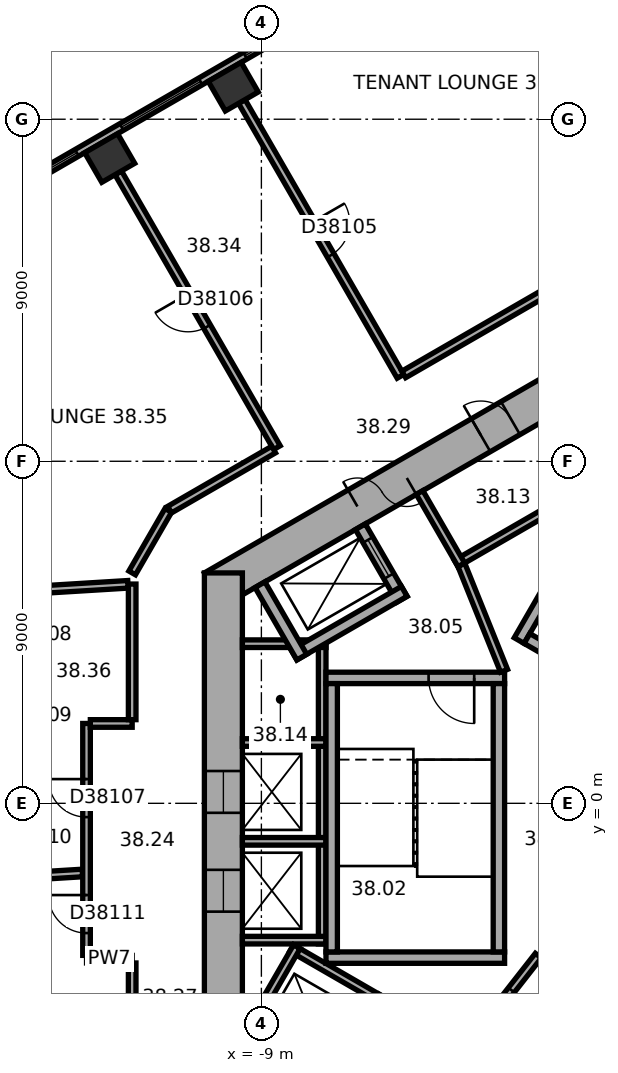
"""IFC4 building model, lengths in metres.
Left out: names, types, materials, properties, quantities, classifications, styles, units other than length and angle.
Written with IfcOpenShell. Run it as: python <this file> out.ifc"""

import sys

from ifc_helpers import new_model, si_unit, direction, frame, frame_2d, origin, origin_2d, place, context, subcontext, project, spatial, rectangle, extrude, element, fill, save


model = new_model("IFC4")
c1 = context("Model", 3, precision=1e-05, world=origin(), true_north=direction((0.0, 1.0)))
c2 = subcontext(c1, "Body", "Model", "MODEL_VIEW")
j1 = project(units=[si_unit("LENGTHUNIT", "METRE"), si_unit("PLANEANGLEUNIT", "RADIAN")], contexts=[c1])
p1 = place(None, origin())
s1 = spatial("IfcSite", under=j1, at=p1, CompositionType="ELEMENT")
p2 = place(p1, origin())
s2 = spatial("IfcBuilding", under=s1, at=p2, CompositionType="ELEMENT")
p3 = place(p2, frame((0.0, 0.0, 157.7)))
s3 = spatial("IfcBuildingStorey", under=s2, at=p3, CompositionType="ELEMENT", Elevation=157.7)
for number, where, z_axis, x_axis in (
    (1, (-9.74, 18.856, 0.0), (0.0, 0.0, 1.0), (-0.866, -0.5, 0.0)),
    (2, (-12.991, 16.979, 0.0), (0.0, 0.0, 1.0), (-0.866, -0.5, 0.0)),
):
    element("IfcColumn", number, at=place(p3, frame(where, z_axis=z_axis, x_axis=x_axis)), inside=s3, PredefinedType="COLUMN", context=c2, shape_type="SweptSolid", body=[
        extrude(rectangle(XDim=1.0, YDim=0.9, at=origin_2d()), origin(), (0.0, 0.0, 1.0), 3.7),
    ])
p4 = place(p3, frame((0.25, 11.691, 0.0), z_axis=(0.0, 0.0, 1.0), x_axis=(-0.866022616891, -0.50000482701, 0.0)))
e3 = element("IfcWall", 3, at=p4, inside=s3, PredefinedType="SHEAR", context=c2, shape_type="SweptSolid", body=[
    extrude(rectangle(XDim=12.125, YDim=1.0, at=frame_2d((6.062, 0.0))), origin(), (0.0, 0.0, 1.0), 3.7),
])
p5 = place(p4, frame((6.262, 0.0, 0.0)))
e4 = element("IfcOpeningElement", 4, at=p5, cuts=e3, PredefinedType="OPENING", context=c2, shape_type="SweptSolid", body=[
    extrude(rectangle(XDim=1.5, YDim=2.1, at=frame_2d((0.75, 1.05))), frame((0.0, 0.51, 0.0), z_axis=(0.0, -1.0, 0.0), x_axis=(1.0, 0.0, 0.0)), (0.0, 0.0, 1.0), 1.02),
])
p6 = place(p4, frame((3.112, 0.0, 0.0)))
e5 = element("IfcOpeningElement", 5, at=p6, cuts=e3, PredefinedType="OPENING", context=c2, shape_type="SweptSolid", body=[
    extrude(rectangle(XDim=0.9, YDim=2.1, at=frame_2d((0.45, 1.05))), frame((0.0, 0.51, 0.0), z_axis=(0.0, -1.0, 0.0), x_axis=(1.0, 0.0, 0.0)), (0.0, 0.0, 1.0), 1.02),
])
p7 = place(p3, frame((-10.0, 6.062, 0.0), z_axis=(0.0, 0.0, 1.0), x_axis=(0.0, -1.0, 0.0)))
e6 = element("IfcWall", 6, at=p7, inside=s3, PredefinedType="SHEAR", context=c2, shape_type="SweptSolid", body=[
    extrude(rectangle(XDim=12.125, YDim=1.0, at=frame_2d((6.062, 0.0))), origin(), (0.0, 0.0, 1.0), 3.7),
])
p8 = place(p7, frame((5.212, 0.0, 0.0)))
e7 = element("IfcOpeningElement", 7, at=p8, cuts=e6, PredefinedType="OPENING", context=c2, shape_type="SweptSolid", body=[
    extrude(rectangle(XDim=1.1, YDim=2.1, at=frame_2d((0.55, 1.05))), frame((0.0, 0.51, 0.0), z_axis=(0.0, -1.0, 0.0), x_axis=(1.0, 0.0, 0.0)), (0.0, 0.0, 1.0), 1.02),
])
p9 = place(p7, frame((7.812, 0.0, 0.0)))
e8 = element("IfcOpeningElement", 8, at=p9, cuts=e6, PredefinedType="OPENING", context=c2, shape_type="SweptSolid", body=[
    extrude(rectangle(XDim=1.1, YDim=2.1, at=frame_2d((0.55, 1.05))), frame((0.0, 0.51, 0.0), z_axis=(0.0, -1.0, 0.0), x_axis=(1.0, 0.0, 0.0)), (0.0, 0.0, 1.0), 1.02),
])
p10 = place(p3, frame((-2.961, 23.405, 0.0), z_axis=(0.0, 0.0, 1.0), x_axis=(-0.866023315909, -0.500003616288, 0.0)))
e9 = element("IfcWall", 9, at=p10, inside=s3, PredefinedType="STANDARD", context=c2, shape_type="SweptSolid", body=[
    extrude(rectangle(XDim=20.044, YDim=0.2, at=frame_2d((10.022, 0.0))), origin(), (0.0, 0.0, 1.0), 3.7),
])
p11 = place(p10, frame((1.314, 0.0, 0.9)))
e10 = element("IfcOpeningElement", 10, at=p11, cuts=e9, PredefinedType="OPENING", context=c2, shape_type="SweptSolid", body=[
    extrude(rectangle(XDim=2.4, YDim=2.0, at=frame_2d((1.2, 1.0))), frame((0.0, 0.11, 0.0), z_axis=(0.0, -1.0, 0.0), x_axis=(1.0, 0.0, 0.0)), (0.0, 0.0, 1.0), 0.22),
])
p12 = place(p10, frame((5.069, 0.0, 0.9)))
e11 = element("IfcOpeningElement", 11, at=p12, cuts=e9, PredefinedType="OPENING", context=c2, shape_type="SweptSolid", body=[
    extrude(rectangle(XDim=2.4, YDim=2.0, at=frame_2d((1.2, 1.0))), frame((0.0, 0.11, 0.0), z_axis=(0.0, -1.0, 0.0), x_axis=(1.0, 0.0, 0.0)), (0.0, 0.0, 1.0), 0.22),
])
p13 = place(p10, frame((8.823, 0.0, 0.9)))
e12 = element("IfcOpeningElement", 12, at=p13, cuts=e9, PredefinedType="OPENING", context=c2, shape_type="SweptSolid", body=[
    extrude(rectangle(XDim=2.4, YDim=2.0, at=frame_2d((1.2, 1.0))), frame((0.0, 0.11, 0.0), z_axis=(0.0, -1.0, 0.0), x_axis=(1.0, 0.0, 0.0)), (0.0, 0.0, 1.0), 0.22),
])
p14 = place(p10, frame((12.577, 0.0, 0.9)))
e13 = element("IfcOpeningElement", 13, at=p14, cuts=e9, PredefinedType="OPENING", context=c2, shape_type="SweptSolid", body=[
    extrude(rectangle(XDim=2.4, YDim=2.0, at=frame_2d((1.2, 1.0))), frame((0.0, 0.11, 0.0), z_axis=(0.0, -1.0, 0.0), x_axis=(1.0, 0.0, 0.0)), (0.0, 0.0, 1.0), 0.22),
])
p15 = place(p10, frame((16.331, 0.0, 0.9)))
e14 = element("IfcOpeningElement", 14, at=p15, cuts=e9, PredefinedType="OPENING", context=c2, shape_type="SweptSolid", body=[
    extrude(rectangle(XDim=2.4, YDim=2.0, at=frame_2d((1.2, 1.0))), frame((0.0, 0.11, 0.0), z_axis=(0.0, -1.0, 0.0), x_axis=(1.0, 0.0, 0.0)), (0.0, 0.0, 1.0), 0.22),
])
p16 = place(p3, frame((0.803, 9.009, 0.0), z_axis=(0.0, 0.0, 1.0), x_axis=(-0.866028230842, -0.499995103361, 0.0)))
e15 = element("IfcWall", 15, at=p16, inside=s3, PredefinedType="PARTITIONING", context=c2, shape_type="SweptSolid", body=[
    extrude(rectangle(XDim=5.4, YDim=0.2, at=frame_2d((2.7, 0.0))), origin(), (0.0, 0.0, 1.0), 3.42),
])
p17 = place(p3, frame((-3.737, 6.272, 0.0), z_axis=(0.0, 0.0, 1.0), x_axis=(-0.50002983664, 0.866008176907, 0.0)))
e16 = element("IfcWall", 16, at=p17, inside=s3, PredefinedType="PARTITIONING", context=c2, shape_type="SweptSolid", body=[
    extrude(rectangle(XDim=2.2, YDim=0.2, at=frame_2d((1.1, 0.0))), origin(), (0.0, 0.0, 1.0), 3.42),
])
p18 = place(p3, frame((-7.4, 4.3, 0.0), z_axis=(0.0, 0.0, 1.0), x_axis=(0.0, -1.0, 0.0)))
e17 = element("IfcWall", 17, at=p18, inside=s3, PredefinedType="PARTITIONING", context=c2, shape_type="SweptSolid", body=[
    extrude(rectangle(XDim=8.0, YDim=0.2, at=frame_2d((4.0, 0.0))), origin(), (0.0, 0.0, 1.0), 3.42),
])
for number, where, z_axis, x_axis in (
    (18, (-7.3, 4.2, 0.0), (0.0, 0.0, 1.0), (-1.0, 0.0, 0.0)),
    (19, (-7.3, 1.6, 0.0), (0.0, 0.0, 1.0), (-1.0, 0.0, 0.0)),
    (20, (-7.3, -1.0, 0.0), (0.0, 0.0, 1.0), (-1.0, 0.0, 0.0)),
    (21, (-7.3, -3.6, 0.0), (0.0, 0.0, 1.0), (-1.0, 0.0, 0.0)),
):
    element("IfcWall", number, at=place(p3, frame(where, z_axis=z_axis, x_axis=x_axis)), inside=s3, PredefinedType="PARTITIONING", context=c2, shape_type="SweptSolid", body=[
        extrude(rectangle(XDim=2.2, YDim=0.2, at=frame_2d((1.1, 0.0))), origin(), (0.0, 0.0, 1.0), 3.42),
    ])
p19 = place(p3, frame((-8.203, -3.809, 0.0), z_axis=(0.0, 0.0, 1.0), x_axis=(0.866028230842, -0.499995103361, 0.0)))
e22 = element("IfcWall", 22, at=p19, inside=s3, PredefinedType="PARTITIONING", context=c2, shape_type="SweptSolid", body=[
    extrude(rectangle(XDim=5.4, YDim=0.2, at=frame_2d((2.7, 0.0))), origin(), (0.0, 0.0, 1.0), 3.42),
])
p20 = place(p3, frame((-8.067, -3.772, 0.0), z_axis=(0.0, 0.0, 1.0), x_axis=(-0.50002983664, -0.866008176907, 0.0)))
e23 = element("IfcWall", 23, at=p20, inside=s3, PredefinedType="PARTITIONING", context=c2, shape_type="SweptSolid", body=[
    extrude(rectangle(XDim=2.2, YDim=0.2, at=frame_2d((1.1, 0.0))), origin(), (0.0, 0.0, 1.0), 3.42),
])
p21 = place(p3, frame((-2.216, 4.282, 0.0), z_axis=(0.0, 0.0, 1.0), x_axis=(0.499977259774, 0.866038532462, 0.0)))
e24 = element("IfcWall", 24, at=p21, inside=s3, PredefinedType="SHEAR", context=c2, shape_type="SweptSolid", body=[
    extrude(rectangle(XDim=4.7, YDim=0.3, at=frame_2d((2.35, 0.0))), origin(), (0.0, 0.0, 1.0), 3.42),
])
p22 = place(p3, frame((4.103, 0.807, 0.0), z_axis=(0.0, 0.0, 1.0), x_axis=(-0.866027801685, 0.499995846692, 0.0)))
e25 = element("IfcWall", 25, at=p22, inside=s3, PredefinedType="SHEAR", context=c2, shape_type="SweptSolid", body=[
    extrude(rectangle(XDim=7.06, YDim=0.3, at=frame_2d((3.53, 0.0))), origin(), (0.0, 0.0, 1.0), 3.42),
])
p23 = place(p3, frame((-2.6, 3.3, 0.0), z_axis=(0.0, 0.0, 1.0), x_axis=(-1.0, 0.0, 0.0)))
e26 = element("IfcWall", 26, at=p23, inside=s3, PredefinedType="SHEAR", context=c2, shape_type="SweptSolid", body=[
    extrude(rectangle(XDim=4.7, YDim=0.3, at=frame_2d((2.35, 0.0))), origin(), (0.0, 0.0, 1.0), 3.42),
])
p24 = place(p23, frame((0.8, 0.0, 0.0)))
e27 = element("IfcOpeningElement", 27, at=p24, cuts=e26, PredefinedType="OPENING", context=c2, shape_type="SweptSolid", body=[
    extrude(rectangle(XDim=1.2, YDim=2.1, at=frame_2d((0.6, 1.05))), frame((0.0, 0.16, 0.0), z_axis=(0.0, -1.0, 0.0), x_axis=(1.0, 0.0, 0.0)), (0.0, 0.0, 1.0), 0.32),
])
p25 = place(p3, frame((-2.6, -4.06, 0.0), z_axis=(0.0, 0.0, 1.0), x_axis=(-1.0, 0.0, 0.0)))
e28 = element("IfcWall", 28, at=p25, inside=s3, PredefinedType="SHEAR", context=c2, shape_type="SweptSolid", body=[
    extrude(rectangle(XDim=4.7, YDim=0.3, at=frame_2d((2.35, 0.0))), origin(), (0.0, 0.0, 1.0), 3.42),
])
for number, where, z_axis, x_axis in (
    (29, (-2.75, 3.15, 0.0), (0.0, 0.0, 1.0), (0.0, -1.0, 0.0)),
    (30, (-7.15, 3.15, 0.0), (0.0, 0.0, 1.0), (0.0, -1.0, 0.0)),
):
    element("IfcWall", number, at=place(p3, frame(where, z_axis=z_axis, x_axis=x_axis)), inside=s3, PredefinedType="SHEAR", context=c2, shape_type="SweptSolid", body=[
        extrude(rectangle(XDim=7.06, YDim=0.3, at=frame_2d((3.53, 0.0))), origin(), (0.0, 0.0, 1.0), 3.42),
    ])
p26 = place(p3, frame((-5.295, 5.372, 0.0), z_axis=(0.0, 0.0, 1.0), x_axis=(-0.500077893725, 0.86598042715, 0.0)))
e31 = element("IfcWall", 31, at=p26, inside=s3, PredefinedType="SHEAR", context=c2, shape_type="SweptSolid", body=[
    extrude(rectangle(XDim=2.2, YDim=0.3, at=frame_2d((1.1, 0.0))), origin(), (0.0, 0.0, 1.0), 3.42),
])
p27 = place(p26, frame((0.7, 0.0, 0.0)))
e32 = element("IfcOpeningElement", 32, at=p27, cuts=e31, PredefinedType="OPENING", context=c2, shape_type="SweptSolid", body=[
    extrude(rectangle(XDim=1.1, YDim=2.1, at=frame_2d((0.55, 1.05))), frame((0.0, 0.16, 0.0), z_axis=(0.0, -1.0, 0.0), x_axis=(1.0, 0.0, 0.0)), (0.0, 0.0, 1.0), 0.32),
])
p28 = place(p3, frame((-5.24, 5.577, 0.0), z_axis=(0.0, 0.0, 1.0), x_axis=(-0.866014461049, -0.500018952895, 0.0)))
e33 = element("IfcWall", 33, at=p28, inside=s3, PredefinedType="SHEAR", context=c2, shape_type="SweptSolid", body=[
    extrude(rectangle(XDim=3.35, YDim=0.3, at=frame_2d((1.675, 0.0))), origin(), (0.0, 0.0, 1.0), 3.42),
])
p29 = place(p3, frame((-7.937, 3.847, 0.0), z_axis=(0.0, 0.0, 1.0), x_axis=(-0.50002983664, 0.866008176907, 0.0)))
e34 = element("IfcWall", 34, at=p29, inside=s3, PredefinedType="SHEAR", context=c2, shape_type="SweptSolid", body=[
    extrude(rectangle(XDim=2.2, YDim=0.3, at=frame_2d((1.1, 0.0))), origin(), (0.0, 0.0, 1.0), 3.42),
])
p30 = place(p3, frame((-2.615, 3.487, 0.0), z_axis=(0.0, 0.0, 1.0), x_axis=(-0.373576831041, 0.92759924068, 0.0)))
e35 = element("IfcWall", 35, at=p30, inside=s3, PredefinedType="PARTITIONING", context=c2, shape_type="SweptSolid", body=[
    extrude(rectangle(XDim=3.002, YDim=0.2, at=frame_2d((1.501, 0.0))), origin(), (0.0, 0.0, 1.0), 3.42),
])
p31 = place(p3, frame((-1.712, -4.008, 0.0), z_axis=(0.0, 0.0, 1.0), x_axis=(-0.616549420702, -0.787316208287, 0.0)))
e36 = element("IfcWall", 36, at=p31, inside=s3, PredefinedType="PARTITIONING", context=c2, shape_type="SweptSolid", body=[
    extrude(rectangle(XDim=3.002, YDim=0.2, at=frame_2d((1.501, 0.0))), origin(), (0.0, 0.0, 1.0), 3.42),
])
p32 = place(p31, frame((1.15, 0.0, 0.0)))
e37 = element("IfcOpeningElement", 37, at=p32, cuts=e36, PredefinedType="OPENING", context=c2, shape_type="SweptSolid", body=[
    extrude(rectangle(XDim=0.9, YDim=2.1, at=frame_2d((0.45, 1.05))), frame((0.0, 0.11, 0.0), z_axis=(0.0, -1.0, 0.0), x_axis=(1.0, 0.0, 0.0)), (0.0, 0.0, 1.0), 0.22),
])
p33 = place(p3, frame((-21.109, 5.237, 0.0), z_axis=(0.0, 0.0, 1.0), x_axis=(0.998135264293, 0.061040922131, 0.0)))
e38 = element("IfcWall", 38, at=p33, inside=s3, PredefinedType="PARTITIONING", context=c2, shape_type="SweptSolid", body=[
    extrude(rectangle(XDim=8.615, YDim=0.2, at=frame_2d((4.308, 0.0))), origin(), (0.0, 0.0, 1.0), 3.42),
])
p34 = place(p3, frame((-20.651, -2.258, 0.0), z_axis=(0.0, 0.0, 1.0), x_axis=(0.998133960965, 0.061062230286, 0.0)))
e39 = element("IfcWall", 39, at=p34, inside=s3, PredefinedType="PARTITIONING", context=c2, shape_type="SweptSolid", body=[
    extrude(rectangle(XDim=6.953, YDim=0.2, at=frame_2d((3.477, 0.0))), origin(), (0.0, 0.0, 1.0), 3.42),
])
p35 = place(p3, frame((-13.601, -4.101, 0.0), z_axis=(0.0, 0.0, 1.0), x_axis=(1.0, 0.0, 0.0)))
e40 = element("IfcWall", 40, at=p35, inside=s3, PredefinedType="PARTITIONING", context=c2, shape_type="SweptSolid", body=[
    extrude(rectangle(XDim=1.201, YDim=0.2, at=frame_2d((0.601, 0.0))), origin(), (0.0, 0.0, 1.0), 3.42),
])
p36 = place(p3, frame((-13.601, 2.101, 0.0), z_axis=(0.0, 0.0, 1.0), x_axis=(0.0, -1.0, 0.0)))
e41 = element("IfcWall", 41, at=p36, inside=s3, PredefinedType="PARTITIONING", context=c2, shape_type="SweptSolid", body=[
    extrude(rectangle(XDim=6.102, YDim=0.2, at=frame_2d((3.051, 0.0))), origin(), (0.0, 0.0, 1.0), 3.42),
])
p37 = place(p36, frame((1.464, 0.0, 0.0)))
e42 = element("IfcOpeningElement", 42, at=p37, cuts=e41, PredefinedType="OPENING", context=c2, shape_type="SweptSolid", body=[
    extrude(rectangle(XDim=1.0, YDim=2.1, at=frame_2d((0.5, 1.05))), frame((0.0, 0.11, 0.0), z_axis=(0.0, -1.0, 0.0), x_axis=(1.0, 0.0, 0.0)), (0.0, 0.0, 1.0), 0.22),
])
p38 = place(p36, frame((4.515, 0.0, 0.0)))
e43 = element("IfcOpeningElement", 43, at=p38, cuts=e41, PredefinedType="OPENING", context=c2, shape_type="SweptSolid", body=[
    extrude(rectangle(XDim=1.0, YDim=2.1, at=frame_2d((0.5, 1.05))), frame((0.0, 0.11, 0.0), z_axis=(0.0, -1.0, 0.0), x_axis=(1.0, 0.0, 0.0)), (0.0, 0.0, 1.0), 0.22),
])
p39 = place(p3, frame((-12.766, 16.589, 0.0), z_axis=(0.0, 0.0, 1.0), x_axis=(0.500010139422, -0.866019549707, 0.0)))
e44 = element("IfcWall", 44, at=p39, inside=s3, PredefinedType="PARTITIONING", context=c2, shape_type="SweptSolid", body=[
    extrude(rectangle(XDim=8.35, YDim=0.2, at=frame_2d((4.175, 0.0))), origin(), (0.0, 0.0, 1.0), 3.42),
])
p40 = place(p39, frame((3.675, 0.0, 0.0)))
e45 = element("IfcOpeningElement", 45, at=p40, cuts=e44, PredefinedType="OPENING", context=c2, shape_type="SweptSolid", body=[
    extrude(rectangle(XDim=1.0, YDim=2.1, at=frame_2d((0.5, 1.05))), frame((0.0, 0.11, 0.0), z_axis=(0.0, -1.0, 0.0), x_axis=(1.0, 0.0, 0.0)), (0.0, 0.0, 1.0), 0.22),
])
p41 = place(p3, frame((-12.4, -4.201, 0.0), z_axis=(0.0, 0.0, 1.0), x_axis=(0.0, -1.0, 0.0)))
e46 = element("IfcWall", 46, at=p41, inside=s3, PredefinedType="PARTITIONING", context=c2, shape_type="SweptSolid", body=[
    extrude(rectangle(XDim=1.821, YDim=0.2, at=frame_2d((0.911, 0.0))), origin(), (0.0, 0.0, 1.0), 3.42),
])
p42 = place(p3, frame((-12.4, 2.101, 0.0), z_axis=(0.0, 0.0, 1.0), x_axis=(-1.0, 0.0, 0.0)))
e47 = element("IfcWall", 47, at=p42, inside=s3, PredefinedType="PARTITIONING", context=c2, shape_type="SweptSolid", body=[
    extrude(rectangle(XDim=1.101, YDim=0.2, at=frame_2d((0.551, 0.0))), origin(), (0.0, 0.0, 1.0), 3.42),
])
p43 = place(p3, frame((-12.4, 5.769, 0.0), z_axis=(0.0, 0.0, 1.0), x_axis=(0.0, -1.0, 0.0)))
e48 = element("IfcWall", 48, at=p43, inside=s3, PredefinedType="PARTITIONING", context=c2, shape_type="SweptSolid", body=[
    extrude(rectangle(XDim=3.568, YDim=0.2, at=frame_2d((1.784, 0.0))), origin(), (0.0, 0.0, 1.0), 3.42),
])
p44 = place(p3, frame((-11.45, 7.708, 0.0), z_axis=(0.0, 0.0, 1.0), x_axis=(-0.500022797313, -0.86601224135, 0.0)))
e49 = element("IfcWall", 49, at=p44, inside=s3, PredefinedType="PARTITIONING", context=c2, shape_type="SweptSolid", body=[
    extrude(rectangle(XDim=1.9, YDim=0.2, at=frame_2d((0.95, 0.0))), origin(), (0.0, 0.0, 1.0), 3.42),
])
p45 = place(p3, frame((-9.515, 18.466, 0.0), z_axis=(0.0, 0.0, 1.0), x_axis=(0.500010139422, -0.866019549707, 0.0)))
e50 = element("IfcWall", 50, at=p45, inside=s3, PredefinedType="PARTITIONING", context=c2, shape_type="SweptSolid", body=[
    extrude(rectangle(XDim=8.35, YDim=0.2, at=frame_2d((4.175, 0.0))), origin(), (0.0, 0.0, 1.0), 2.87),
])
p46 = place(p45, frame((3.675, 0.0, 0.0)))
e51 = element("IfcOpeningElement", 51, at=p46, cuts=e50, PredefinedType="OPENING", context=c2, shape_type="SweptSolid", body=[
    extrude(rectangle(XDim=1.0, YDim=2.1, at=frame_2d((0.5, 1.05))), frame((0.0, 0.11, 0.0), z_axis=(0.0, -1.0, 0.0), x_axis=(1.0, 0.0, 0.0)), (0.0, 0.0, 1.0), 0.22),
])
p47 = place(p3, frame((-8.678, 9.308, 0.0), z_axis=(0.0, 0.0, 1.0), x_axis=(-0.866000359435, -0.500043375578, 0.0)))
e52 = element("IfcWall", 52, at=p47, inside=s3, PredefinedType="PARTITIONING", context=c2, shape_type="SweptSolid", body=[
    extrude(rectangle(XDim=3.161, YDim=0.2, at=frame_2d((1.581, 0.0))), origin(), (0.0, 0.0, 1.0), 3.42),
])
p48 = place(p3, frame((-0.95, 13.77, 0.0), z_axis=(0.0, 0.0, 1.0), x_axis=(-0.866036689987, -0.499980451214, 0.0)))
e53 = element("IfcWall", 53, at=p48, inside=s3, PredefinedType="PARTITIONING", context=c2, shape_type="SweptSolid", body=[
    extrude(rectangle(XDim=4.969, YDim=0.2, at=frame_2d((2.485, 0.0))), origin(), (0.0, 0.0, 1.0), 3.42),
])
p49 = place(p12, origin())
e54 = element("IfcWindow", 54, at=p49, inside=s3, PartitioningType="SINGLE_PANEL", PredefinedType="WINDOW", context=c2, shape_type="SweptSolid", body=[
    extrude(rectangle(XDim=2.4, YDim=2.0, at=frame_2d((1.2, 1.0))), frame((0.0, 0.03, 0.0), z_axis=(0.0, -1.0, 0.0), x_axis=(1.0, 0.0, 0.0)), (0.0, 0.0, 1.0), 0.06),
])
fill(e11, e54)
p50 = place(p13, origin())
e55 = element("IfcWindow", 55, at=p50, inside=s3, PartitioningType="SINGLE_PANEL", PredefinedType="WINDOW", context=c2, shape_type="SweptSolid", body=[
    extrude(rectangle(XDim=2.4, YDim=2.0, at=frame_2d((1.2, 1.0))), frame((0.0, 0.03, 0.0), z_axis=(0.0, -1.0, 0.0), x_axis=(1.0, 0.0, 0.0)), (0.0, 0.0, 1.0), 0.06),
])
fill(e12, e55)
p51 = place(p14, origin())
e56 = element("IfcWindow", 56, at=p51, inside=s3, PartitioningType="SINGLE_PANEL", PredefinedType="WINDOW", context=c2, shape_type="SweptSolid", body=[
    extrude(rectangle(XDim=2.4, YDim=2.0, at=frame_2d((1.2, 1.0))), frame((0.0, 0.03, 0.0), z_axis=(0.0, -1.0, 0.0), x_axis=(1.0, 0.0, 0.0)), (0.0, 0.0, 1.0), 0.06),
])
fill(e13, e56)
p52 = place(p5, origin())
e57 = element("IfcDoor", 57, at=p52, inside=s3, OperationType="DOUBLE_DOOR_SINGLE_SWING", PredefinedType="DOOR", context=c2, shape_type="SweptSolid", body=[
    extrude(rectangle(XDim=1.5, YDim=2.1, at=frame_2d((0.75, 1.05))), frame((0.0, 0.025, 0.0), z_axis=(0.0, -1.0, 0.0), x_axis=(1.0, 0.0, 0.0)), (0.0, 0.0, 1.0), 0.05),
])
fill(e4, e57)
p53 = place(p24, origin())
e58 = element("IfcDoor", 58, at=p53, inside=s3, OperationType="SINGLE_SWING_RIGHT", PredefinedType="DOOR", context=c2, shape_type="SweptSolid", body=[
    extrude(rectangle(XDim=1.2, YDim=2.1, at=frame_2d((0.6, 1.05))), frame((0.0, 0.025, 0.0), z_axis=(0.0, -1.0, 0.0), x_axis=(1.0, 0.0, 0.0)), (0.0, 0.0, 1.0), 0.05),
])
fill(e27, e58)
p54 = place(p32, origin())
e59 = element("IfcDoor", 59, at=p54, inside=s3, OperationType="SINGLE_SWING_LEFT", PredefinedType="DOOR", context=c2, shape_type="SweptSolid", body=[
    extrude(rectangle(XDim=0.9, YDim=2.1, at=frame_2d((0.45, 1.05))), frame((0.0, 0.025, 0.0), z_axis=(0.0, -1.0, 0.0), x_axis=(1.0, 0.0, 0.0)), (0.0, 0.0, 1.0), 0.05),
])
fill(e37, e59)
p55 = place(p6, origin())
e60 = element("IfcDoor", 60, at=p55, inside=s3, OperationType="SINGLE_SWING_LEFT", PredefinedType="DOOR", context=c2, shape_type="SweptSolid", body=[
    extrude(rectangle(XDim=0.9, YDim=2.1, at=frame_2d((0.45, 1.05))), frame((0.0, 0.025, 0.0), z_axis=(0.0, -1.0, 0.0), x_axis=(1.0, 0.0, 0.0)), (0.0, 0.0, 1.0), 0.05),
])
fill(e5, e60)
p56 = place(p27, origin())
e61 = element("IfcDoor", 61, at=p56, inside=s3, OperationType="DOUBLE_DOOR_SLIDING", PredefinedType="DOOR", context=c2, shape_type="SweptSolid", body=[
    extrude(rectangle(XDim=1.1, YDim=2.1, at=frame_2d((0.55, 1.05))), frame((0.0, 0.025, 0.0), z_axis=(0.0, -1.0, 0.0), x_axis=(1.0, 0.0, 0.0)), (0.0, 0.0, 1.0), 0.05),
])
fill(e32, e61)
p57 = place(p8, origin())
e62 = element("IfcDoor", 62, at=p57, inside=s3, OperationType="DOUBLE_DOOR_SLIDING", PredefinedType="DOOR", context=c2, shape_type="SweptSolid", body=[
    extrude(rectangle(XDim=1.1, YDim=2.1, at=frame_2d((0.55, 1.05))), frame((0.0, 0.025, 0.0), z_axis=(0.0, -1.0, 0.0), x_axis=(1.0, 0.0, 0.0)), (0.0, 0.0, 1.0), 0.05),
])
fill(e7, e62)
p58 = place(p9, origin())
e63 = element("IfcDoor", 63, at=p58, inside=s3, OperationType="DOUBLE_DOOR_SLIDING", PredefinedType="DOOR", context=c2, shape_type="SweptSolid", body=[
    extrude(rectangle(XDim=1.1, YDim=2.1, at=frame_2d((0.55, 1.05))), frame((0.0, 0.025, 0.0), z_axis=(0.0, -1.0, 0.0), x_axis=(1.0, 0.0, 0.0)), (0.0, 0.0, 1.0), 0.05),
])
fill(e8, e63)
p59 = place(p46, origin())
e64 = element("IfcDoor", 64, at=p59, inside=s3, OperationType="SINGLE_SWING_LEFT", PredefinedType="DOOR", context=c2, shape_type="SweptSolid", body=[
    extrude(rectangle(XDim=1.0, YDim=2.1, at=frame_2d((0.5, 1.05))), frame((0.0, 0.025, 0.0), z_axis=(0.0, -1.0, 0.0), x_axis=(1.0, 0.0, 0.0)), (0.0, 0.0, 1.0), 0.05),
])
fill(e51, e64)
p60 = place(p40, origin())
e65 = element("IfcDoor", 65, at=p60, inside=s3, OperationType="SINGLE_SWING_LEFT", PredefinedType="DOOR", context=c2, shape_type="SweptSolid", body=[
    extrude(rectangle(XDim=1.0, YDim=2.1, at=frame_2d((0.5, 1.05))), frame((0.0, 0.025, 0.0), z_axis=(0.0, -1.0, 0.0), x_axis=(1.0, 0.0, 0.0)), (0.0, 0.0, 1.0), 0.05),
])
fill(e45, e65)
p61 = place(p37, origin())
e66 = element("IfcDoor", 66, at=p61, inside=s3, OperationType="SINGLE_SWING_LEFT", PredefinedType="DOOR", context=c2, shape_type="SweptSolid", body=[
    extrude(rectangle(XDim=1.0, YDim=2.1, at=frame_2d((0.5, 1.05))), frame((0.0, 0.025, 0.0), z_axis=(0.0, -1.0, 0.0), x_axis=(1.0, 0.0, 0.0)), (0.0, 0.0, 1.0), 0.05),
])
fill(e42, e66)
p62 = place(p38, origin())
e67 = element("IfcDoor", 67, at=p62, inside=s3, OperationType="SINGLE_SWING_LEFT", PredefinedType="DOOR", context=c2, shape_type="SweptSolid", body=[
    extrude(rectangle(XDim=1.0, YDim=2.1, at=frame_2d((0.5, 1.05))), frame((0.0, 0.025, 0.0), z_axis=(0.0, -1.0, 0.0), x_axis=(1.0, 0.0, 0.0)), (0.0, 0.0, 1.0), 0.05),
])
fill(e43, e67)
save(model, sys.argv[1])
